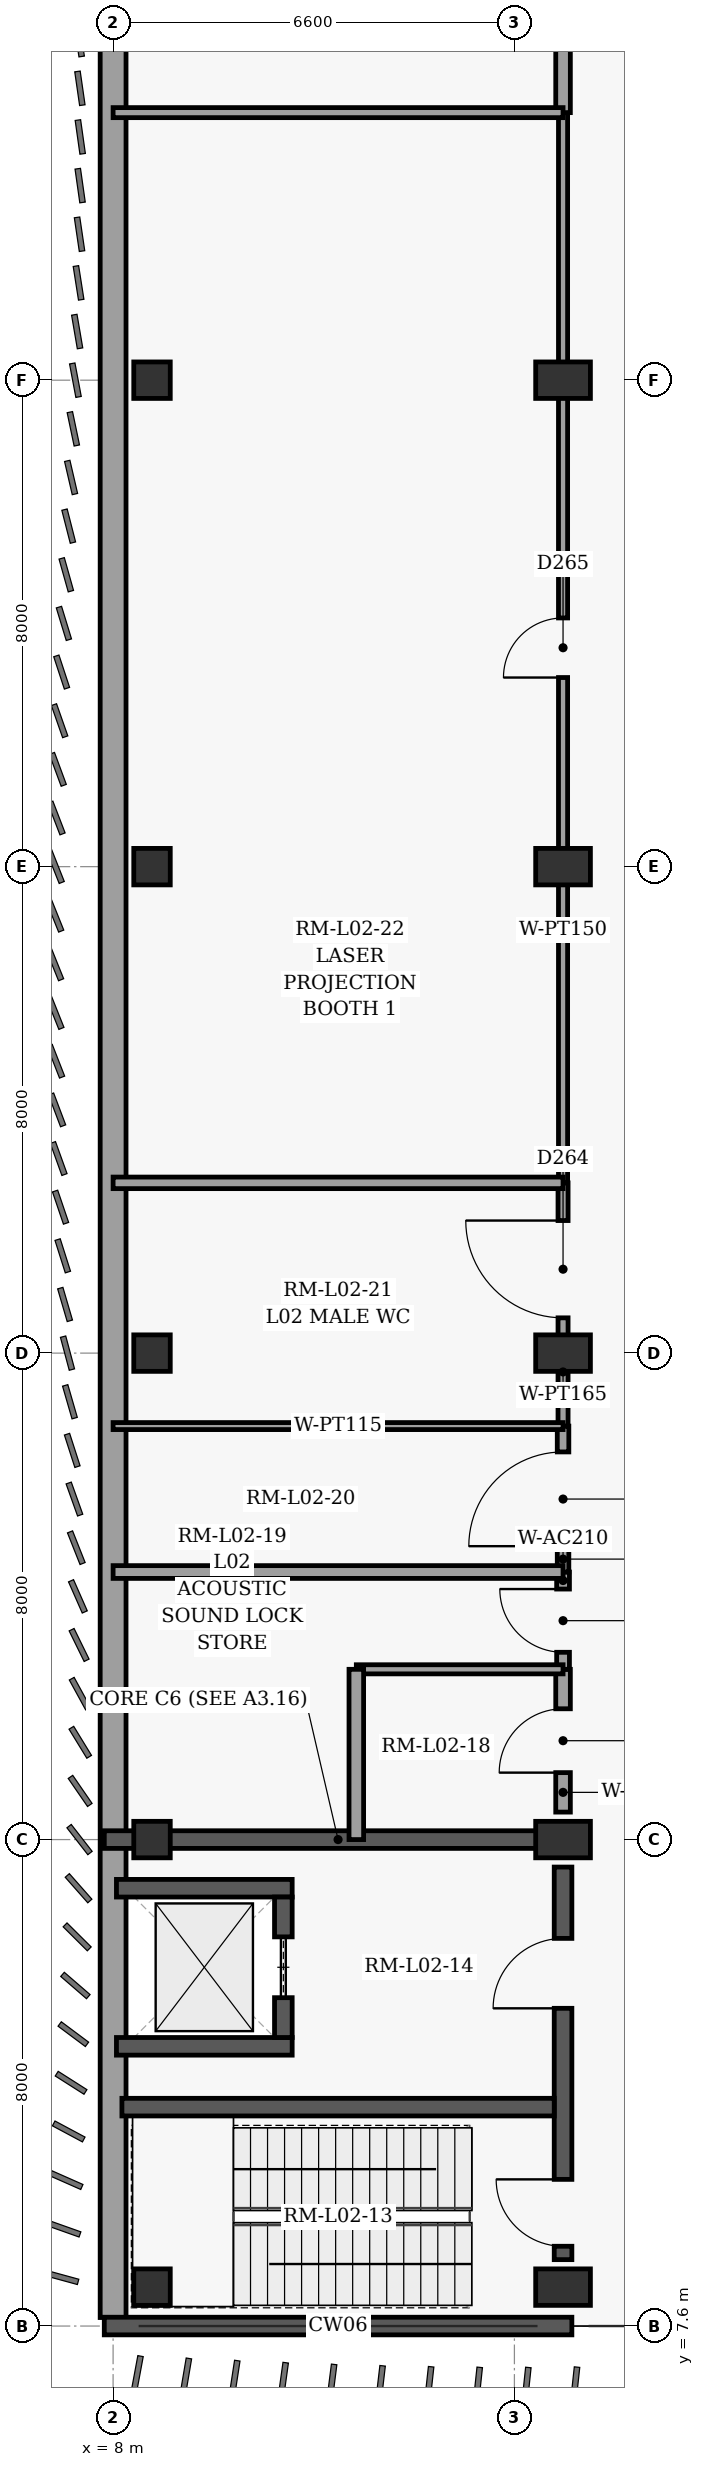
"""IFC4 building model, lengths in metres.
Left out: names, types, materials, properties, quantities, classifications, styles, units other than length and angle.
Written with IfcOpenShell. Run it as: python <this file> out.ifc"""

import sys

from ifc_helpers import new_model, si_unit, direction, frame, frame_2d, origin, origin_2d, place, context, subcontext, project, spatial, rectangle, extrude, element, fill, save


model = new_model("IFC4")
c1 = context("Model", 3, precision=1e-05, world=origin(), true_north=direction((0.0, 1.0)))
c2 = subcontext(c1, "Body", "Model", "MODEL_VIEW")
j1 = project(units=[si_unit("LENGTHUNIT", "METRE"), si_unit("PLANEANGLEUNIT", "RADIAN")], contexts=[c1])
p1 = place(None, origin())
s1 = spatial("IfcSite", under=j1, at=p1, CompositionType="ELEMENT")
p2 = place(p1, origin())
s2 = spatial("IfcBuilding", under=s1, at=p2, CompositionType="ELEMENT")
p3 = place(p2, frame((0.0, 0.0, 10.2)))
s3 = spatial("IfcBuildingStorey", under=s2, at=p3, CompositionType="ELEMENT", Elevation=10.2)
for number, where, z_axis, x_axis in (
    (1, (8.64, 8.24, 0.0), (0.0, 0.0, 1.0), (1.0, 0.0, 0.0)),
    (2, (8.64, 15.6, 0.0), (0.0, 0.0, 1.0), (1.0, 0.0, 0.0)),
    (3, (8.64, 23.6, 0.0), (0.0, 0.0, 1.0), (1.0, 0.0, 0.0)),
    (4, (8.64, 31.6, 0.0), (0.0, 0.0, 1.0), (1.0, 0.0, 0.0)),
    (5, (8.64, 39.6, 0.0), (0.0, 0.0, 1.0), (1.0, 0.0, 0.0)),
):
    element("IfcColumn", number, at=place(p3, frame(where, z_axis=z_axis, x_axis=x_axis)), inside=s3, PredefinedType="COLUMN", context=c2, shape_type="SweptSolid", body=[
        extrude(rectangle(XDim=0.6, YDim=0.6, at=origin_2d()), origin(), (0.0, 0.0, 1.0), 5.4),
    ])
for number, where, z_axis, x_axis in (
    (6, (15.4, 8.24, 0.0), (0.0, 0.0, 1.0), (1.0, 0.0, 0.0)),
    (7, (15.4, 15.6, 0.0), (0.0, 0.0, 1.0), (1.0, 0.0, 0.0)),
    (8, (15.4, 23.6, 0.0), (0.0, 0.0, 1.0), (1.0, 0.0, 0.0)),
    (9, (15.4, 31.6, 0.0), (0.0, 0.0, 1.0), (1.0, 0.0, 0.0)),
    (10, (15.4, 39.6, 0.0), (0.0, 0.0, 1.0), (1.0, 0.0, 0.0)),
):
    element("IfcColumn", number, at=place(p3, frame(where, z_axis=z_axis, x_axis=x_axis)), inside=s3, PredefinedType="COLUMN", context=c2, shape_type="SweptSolid", body=[
        extrude(rectangle(XDim=0.6, YDim=0.9, at=origin_2d()), origin(), (0.0, 0.0, 1.0), 5.4),
    ])
p4 = place(p3, frame((8.0, 7.74, 0.0), z_axis=(0.0, 0.0, 1.0), x_axis=(0.0, 1.0, 0.0)))
e11 = element("IfcWall", 11, at=p4, inside=s3, PredefinedType="SOLIDWALL", context=c2, shape_type="SweptSolid", body=[
    extrude(rectangle(XDim=55.72, YDim=0.425, at=frame_2d((27.86, 0.0))), origin(), (0.0, 0.0, 1.0), 5.16),
])
p5 = place(p3, frame((7.855, 7.6, 0.0), z_axis=(0.0, 0.0, 1.0), x_axis=(1.0, 0.0, 0.0)))
e12 = element("IfcWall", 12, at=p5, inside=s3, PredefinedType="SHEAR", context=c2, shape_type="SweptSolid", body=[
    extrude(rectangle(XDim=7.69, YDim=0.29, at=frame_2d((3.845, 0.0))), origin(), (0.0, 0.0, 1.0), 5.16),
])
p6 = place(p3, frame((7.855, 15.6, 0.0), z_axis=(0.0, 0.0, 1.0), x_axis=(1.0, 0.0, 0.0)))
e13 = element("IfcWall", 13, at=p6, inside=s3, PredefinedType="SHEAR", context=c2, shape_type="SweptSolid", body=[
    extrude(rectangle(XDim=7.243, YDim=0.29, at=frame_2d((3.622, 0.0))), origin(), (0.0, 0.0, 1.0), 5.16),
])
p7 = place(p3, frame((15.4, 8.692, 0.0), z_axis=(0.0, 0.0, 1.0), x_axis=(0.0, 1.0, 0.0)))
e14 = element("IfcWall", 14, at=p7, inside=s3, PredefinedType="SHEAR", context=c2, shape_type="SweptSolid", body=[
    extrude(rectangle(XDim=6.456, YDim=0.29, at=frame_2d((3.228, 0.0))), origin(), (0.0, 0.0, 1.0), 5.16),
])
p8 = place(p7, frame((0.22, 0.0, 0.0)))
e15 = element("IfcOpeningElement", 15, at=p8, cuts=e14, PredefinedType="OPENING", context=c2, shape_type="SweptSolid", body=[
    extrude(rectangle(XDim=1.1, YDim=2.15, at=frame_2d((0.55, 1.075))), frame((0.0, 0.155, 0.0), z_axis=(0.0, -1.0, 0.0), x_axis=(1.0, 0.0, 0.0)), (0.0, 0.0, 1.0), 0.31),
])
p9 = place(p7, frame((4.133, 0.0, 0.0)))
e16 = element("IfcOpeningElement", 16, at=p9, cuts=e14, PredefinedType="OPENING", context=c2, shape_type="SweptSolid", body=[
    extrude(rectangle(XDim=1.15, YDim=2.2, at=frame_2d((0.575, 1.1))), frame((0.0, 0.155, 0.0), z_axis=(0.0, -1.0, 0.0), x_axis=(1.0, 0.0, 0.0)), (0.0, 0.0, 1.0), 0.31),
])
p10 = place(p3, frame((8.145, 11.2, 0.0), z_axis=(0.0, 0.0, 1.0), x_axis=(1.0, 0.0, 0.0)))
e17 = element("IfcWall", 17, at=p10, inside=s3, PredefinedType="SHEAR", context=c2, shape_type="SweptSolid", body=[
    extrude(rectangle(XDim=7.11, YDim=0.29, at=frame_2d((3.555, 0.0))), origin(), (0.0, 0.0, 1.0), 5.16),
])
for number, where, z_axis, x_axis in (
    (18, (8.055, 12.2, 0.0), (0.0, 0.0, 1.0), (1.0, 0.0, 0.0)),
    (19, (8.055, 14.8, 0.0), (0.0, 0.0, 1.0), (1.0, 0.0, 0.0)),
):
    element("IfcWall", number, at=place(p3, frame(where, z_axis=z_axis, x_axis=x_axis)), inside=s3, PredefinedType="SHEAR", context=c2, shape_type="SweptSolid", body=[
        extrude(rectangle(XDim=2.89, YDim=0.29, at=frame_2d((1.445, 0.0))), origin(), (0.0, 0.0, 1.0), 5.16),
    ])
p11 = place(p3, frame((10.8, 12.345, 0.0), z_axis=(0.0, 0.0, 1.0), x_axis=(0.0, 1.0, 0.0)))
e20 = element("IfcWall", 20, at=p11, inside=s3, PredefinedType="SHEAR", context=c2, shape_type="SweptSolid", body=[
    extrude(rectangle(XDim=2.31, YDim=0.29, at=frame_2d((1.155, 0.0))), origin(), (0.0, 0.0, 1.0), 5.16),
])
p12 = place(p11, frame((0.655, 0.0, 0.0)))
e21 = element("IfcOpeningElement", 21, at=p12, cuts=e20, PredefinedType="OPENING", context=c2, shape_type="SweptSolid", body=[
    extrude(rectangle(XDim=1.0, YDim=2.15, at=frame_2d((0.5, 1.075))), frame((0.0, 0.155, 0.0), z_axis=(0.0, -1.0, 0.0), x_axis=(1.0, 0.0, 0.0)), (0.0, 0.0, 1.0), 0.31),
])
p13 = place(p3, frame((15.4, 16.052, 0.0), z_axis=(0.0, 0.0, 1.0), x_axis=(0.0, 1.0, 0.0)))
e22 = element("IfcWall", 22, at=p13, inside=s3, PredefinedType="PARTITIONING", context=c2, shape_type="SweptSolid", body=[
    extrude(rectangle(XDim=2.348, YDim=0.24, at=frame_2d((1.174, 0.0))), origin(), (0.0, 0.0, 1.0), 4.31),
])
p14 = place(p13, frame((0.649, 0.0, 0.0)))
e23 = element("IfcOpeningElement", 23, at=p14, cuts=e22, PredefinedType="OPENING", context=c2, shape_type="SweptSolid", body=[
    extrude(rectangle(XDim=1.05, YDim=2.15, at=frame_2d((0.525, 1.075))), frame((0.0, 0.13, 0.0), z_axis=(0.0, -1.0, 0.0), x_axis=(1.0, 0.0, 0.0)), (0.0, 0.0, 1.0), 0.26),
])
p15 = place(p3, frame((15.4, 18.4, 0.0), z_axis=(0.0, 0.0, 1.0), x_axis=(0.0, 1.0, 0.0)))
e24 = element("IfcWall", 24, at=p15, inside=s3, PredefinedType="PARTITIONING", context=c2, shape_type="SweptSolid", body=[
    extrude(rectangle(XDim=1.6, YDim=0.21, at=frame_2d((0.8, 0.0))), origin(), (0.0, 0.0, 1.0), 4.31),
])
p16 = place(p15, frame((0.28, 0.0, 0.0)))
e25 = element("IfcOpeningElement", 25, at=p16, cuts=e24, PredefinedType="OPENING", context=c2, shape_type="SweptSolid", body=[
    extrude(rectangle(XDim=1.04, YDim=2.2, at=frame_2d((0.52, 1.1))), frame((0.0, 0.115, 0.0), z_axis=(0.0, -1.0, 0.0), x_axis=(1.0, 0.0, 0.0)), (0.0, 0.0, 1.0), 0.23),
])
p17 = place(p3, frame((15.4, 20.0, 0.0), z_axis=(0.0, 0.0, 1.0), x_axis=(0.0, 1.0, 0.0)))
e26 = element("IfcWall", 26, at=p17, inside=s3, PredefinedType="PARTITIONING", context=c2, shape_type="SweptSolid", body=[
    extrude(rectangle(XDim=2.4, YDim=0.19, at=frame_2d((1.2, 0.0))), origin(), (0.0, 0.0, 1.0), 4.31),
])
p18 = place(p17, frame((0.425, 0.0, 0.0)))
e27 = element("IfcOpeningElement", 27, at=p18, cuts=e26, PredefinedType="OPENING", context=c2, shape_type="SweptSolid", body=[
    extrude(rectangle(XDim=1.55, YDim=2.25, at=frame_2d((0.775, 1.125))), frame((0.0, 0.105, 0.0), z_axis=(0.0, -1.0, 0.0), x_axis=(1.0, 0.0, 0.0)), (0.0, 0.0, 1.0), 0.21),
])
p19 = place(p3, frame((15.4, 22.4, 0.0), z_axis=(0.0, 0.0, 1.0), x_axis=(0.0, 1.0, 0.0)))
e28 = element("IfcWall", 28, at=p19, inside=s3, PredefinedType="PARTITIONING", context=c2, shape_type="SweptSolid", body=[
    extrude(rectangle(XDim=4.0, YDim=0.165, at=frame_2d((2.0, 0.0))), origin(), (0.0, 0.0, 1.0), 4.31),
])
p20 = place(p19, frame((1.78, 0.0, 0.0)))
e29 = element("IfcOpeningElement", 29, at=p20, cuts=e28, PredefinedType="OPENING", context=c2, shape_type="SweptSolid", body=[
    extrude(rectangle(XDim=1.6, YDim=2.3, at=frame_2d((0.8, 1.15))), frame((0.0, 0.093, 0.0), z_axis=(0.0, -1.0, 0.0), x_axis=(1.0, 0.0, 0.0)), (0.0, 0.0, 1.0), 0.185),
])
p21 = place(p3, frame((15.4, 26.4, 0.0), z_axis=(0.0, 0.0, 1.0), x_axis=(0.0, 1.0, 0.0)))
e30 = element("IfcWall", 30, at=p21, inside=s3, PredefinedType="PARTITIONING", context=c2, shape_type="SweptSolid", body=[
    extrude(rectangle(XDim=17.6, YDim=0.15, at=frame_2d((8.8, 0.0))), origin(), (0.0, 0.0, 1.0), 4.31),
])
p22 = place(p21, frame((8.31, 0.0, 0.0)))
e31 = element("IfcOpeningElement", 31, at=p22, cuts=e30, PredefinedType="OPENING", context=c2, shape_type="SweptSolid", body=[
    extrude(rectangle(XDim=0.98, YDim=2.1, at=frame_2d((0.49, 1.05))), frame((0.0, 0.085, 0.0), z_axis=(0.0, -1.0, 0.0), x_axis=(1.0, 0.0, 0.0)), (0.0, 0.0, 1.0), 0.17),
])
p23 = place(p3, frame((15.4, 44.0, 0.0), z_axis=(0.0, 0.0, 1.0), x_axis=(0.0, 1.0, 0.0)))
e32 = element("IfcWall", 32, at=p23, inside=s3, PredefinedType="PARTITIONING", context=c2, shape_type="SweptSolid", body=[
    extrude(rectangle(XDim=19.6, YDim=0.24, at=frame_2d((9.8, 0.0))), origin(), (0.0, 0.0, 1.0), 4.31),
])
p24 = place(p23, frame((9.3, 0.0, 0.0)))
e33 = element("IfcOpeningElement", 33, at=p24, cuts=e32, PredefinedType="OPENING", context=c2, shape_type="SweptSolid", body=[
    extrude(rectangle(XDim=1.0, YDim=2.1, at=frame_2d((0.5, 1.05))), frame((0.0, 0.13, 0.0), z_axis=(0.0, -1.0, 0.0), x_axis=(1.0, 0.0, 0.0)), (0.0, 0.0, 1.0), 0.26),
])
p25 = place(p3, frame((12.0, 18.4, 0.0), z_axis=(0.0, 0.0, 1.0), x_axis=(1.0, 0.0, 0.0)))
e34 = element("IfcWall", 34, at=p25, inside=s3, PredefinedType="PARTITIONING", context=c2, shape_type="SweptSolid", body=[
    extrude(rectangle(XDim=3.4, YDim=0.15, at=frame_2d((1.7, 0.0))), origin(), (0.0, 0.0, 1.0), 5.16),
])
p26 = place(p3, frame((12.0, 15.6, 0.0), z_axis=(0.0, 0.0, 1.0), x_axis=(0.0, 1.0, 0.0)))
e35 = element("IfcWall", 35, at=p26, inside=s3, PredefinedType="PARTITIONING", context=c2, shape_type="SweptSolid", body=[
    extrude(rectangle(XDim=2.8, YDim=0.24, at=frame_2d((1.4, 0.0))), origin(), (0.0, 0.0, 1.0), 5.16),
])
p27 = place(p3, frame((8.0, 20.0, 0.0), z_axis=(0.0, 0.0, 1.0), x_axis=(1.0, 0.0, 0.0)))
e36 = element("IfcWall", 36, at=p27, inside=s3, PredefinedType="PARTITIONING", context=c2, shape_type="SweptSolid", body=[
    extrude(rectangle(XDim=7.4, YDim=0.21, at=frame_2d((3.7, 0.0))), origin(), (0.0, 0.0, 1.0), 5.16),
])
p28 = place(p3, frame((8.0, 22.4, 0.0), z_axis=(0.0, 0.0, 1.0), x_axis=(1.0, 0.0, 0.0)))
e37 = element("IfcWall", 37, at=p28, inside=s3, PredefinedType="PARTITIONING", context=c2, shape_type="SweptSolid", body=[
    extrude(rectangle(XDim=7.4, YDim=0.115, at=frame_2d((3.7, 0.0))), origin(), (0.0, 0.0, 1.0), 5.16),
])
p29 = place(p3, frame((8.0, 26.4, 0.0), z_axis=(0.0, 0.0, 1.0), x_axis=(1.0, 0.0, 0.0)))
e38 = element("IfcWall", 38, at=p29, inside=s3, PredefinedType="PARTITIONING", context=c2, shape_type="SweptSolid", body=[
    extrude(rectangle(XDim=7.4, YDim=0.19, at=frame_2d((3.7, 0.0))), origin(), (0.0, 0.0, 1.0), 5.16),
])
p30 = place(p3, frame((8.0, 44.0, 0.0), z_axis=(0.0, 0.0, 1.0), x_axis=(1.0, 0.0, 0.0)))
e39 = element("IfcWall", 39, at=p30, inside=s3, PredefinedType="PARTITIONING", context=c2, shape_type="SweptSolid", body=[
    extrude(rectangle(XDim=7.4, YDim=0.165, at=frame_2d((3.7, 0.0))), origin(), (0.0, 0.0, 1.0), 5.16),
])
p31 = place(p8, origin())
e40 = element("IfcDoor", 40, at=p31, inside=s3, OperationType="SINGLE_SWING_RIGHT", PredefinedType="DOOR", context=c2, shape_type="SweptSolid", body=[
    extrude(rectangle(XDim=1.1, YDim=2.15, at=frame_2d((0.55, 1.075))), frame((0.0, 0.025, 0.0), z_axis=(0.0, -1.0, 0.0), x_axis=(1.0, 0.0, 0.0)), (0.0, 0.0, 1.0), 0.05),
])
fill(e15, e40)
p32 = place(p9, origin())
e41 = element("IfcDoor", 41, at=p32, inside=s3, OperationType="SINGLE_SWING_LEFT", PredefinedType="DOOR", context=c2, shape_type="SweptSolid", body=[
    extrude(rectangle(XDim=1.15, YDim=2.2, at=frame_2d((0.575, 1.1))), frame((0.0, 0.025, 0.0), z_axis=(0.0, -1.0, 0.0), x_axis=(1.0, 0.0, 0.0)), (0.0, 0.0, 1.0), 0.05),
])
fill(e16, e41)
p33 = place(p12, origin())
e42 = element("IfcDoor", 42, at=p33, inside=s3, OperationType="SLIDING_TO_LEFT", PredefinedType="DOOR", context=c2, shape_type="SweptSolid", body=[
    extrude(rectangle(XDim=1.0, YDim=2.15, at=frame_2d((0.5, 1.075))), frame((0.0, 0.025, 0.0), z_axis=(0.0, -1.0, 0.0), x_axis=(1.0, 0.0, 0.0)), (0.0, 0.0, 1.0), 0.05),
])
fill(e21, e42)
p34 = place(p14, origin())
e43 = element("IfcDoor", 43, at=p34, inside=s3, OperationType="SINGLE_SWING_LEFT", PredefinedType="DOOR", context=c2, shape_type="SweptSolid", body=[
    extrude(rectangle(XDim=1.05, YDim=2.15, at=frame_2d((0.525, 1.075))), frame((0.0, 0.025, 0.0), z_axis=(0.0, -1.0, 0.0), x_axis=(1.0, 0.0, 0.0)), (0.0, 0.0, 1.0), 0.05),
])
fill(e23, e43)
p35 = place(p16, origin())
e44 = element("IfcDoor", 44, at=p35, inside=s3, OperationType="SINGLE_SWING_RIGHT", PredefinedType="DOOR", context=c2, shape_type="SweptSolid", body=[
    extrude(rectangle(XDim=1.04, YDim=2.2, at=frame_2d((0.52, 1.1))), frame((0.0, 0.025, 0.0), z_axis=(0.0, -1.0, 0.0), x_axis=(1.0, 0.0, 0.0)), (0.0, 0.0, 1.0), 0.05),
])
fill(e25, e44)
p36 = place(p18, origin())
e45 = element("IfcDoor", 45, at=p36, inside=s3, OperationType="SINGLE_SWING_LEFT", PredefinedType="DOOR", context=c2, shape_type="SweptSolid", body=[
    extrude(rectangle(XDim=1.55, YDim=2.25, at=frame_2d((0.775, 1.125))), frame((0.0, 0.025, 0.0), z_axis=(0.0, -1.0, 0.0), x_axis=(1.0, 0.0, 0.0)), (0.0, 0.0, 1.0), 0.05),
])
fill(e27, e45)
p37 = place(p20, origin())
e46 = element("IfcDoor", 46, at=p37, inside=s3, OperationType="SINGLE_SWING_RIGHT", PredefinedType="DOOR", context=c2, shape_type="SweptSolid", body=[
    extrude(rectangle(XDim=1.6, YDim=2.3, at=frame_2d((0.8, 1.15))), frame((0.0, 0.025, 0.0), z_axis=(0.0, -1.0, 0.0), x_axis=(1.0, 0.0, 0.0)), (0.0, 0.0, 1.0), 0.05),
])
fill(e29, e46)
p38 = place(p22, origin())
e47 = element("IfcDoor", 47, at=p38, inside=s3, OperationType="SINGLE_SWING_LEFT", PredefinedType="DOOR", context=c2, shape_type="SweptSolid", body=[
    extrude(rectangle(XDim=0.98, YDim=2.1, at=frame_2d((0.49, 1.05))), frame((0.0, 0.025, 0.0), z_axis=(0.0, -1.0, 0.0), x_axis=(1.0, 0.0, 0.0)), (0.0, 0.0, 1.0), 0.05),
])
fill(e31, e47)
save(model, sys.argv[1])
